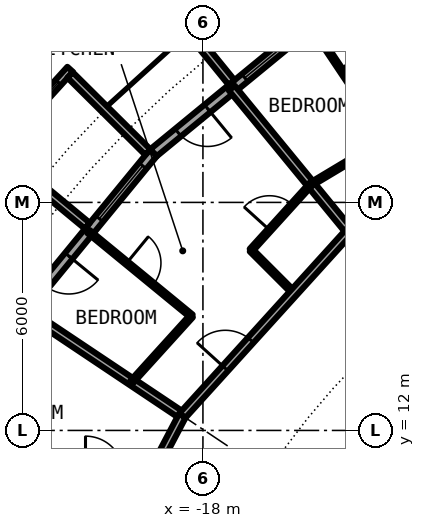
"""IFC4 building model, lengths in metres.
Left out: names, types, materials, properties, quantities, classifications, styles, units other than length and angle.
Written with IfcOpenShell. Run it as: python <this file> out.ifc"""

import sys

from ifc_helpers import new_model, si_unit, direction, frame, frame_2d, origin, place, context, subcontext, project, spatial, rectangle, circle, extrude, element, fill, save


model = new_model("IFC4")
c1 = context("Model", 3, precision=1e-05, world=origin(), true_north=direction((0.0, 1.0)))
c2 = subcontext(c1, "Body", "Model", "MODEL_VIEW")
j1 = project(units=[si_unit("LENGTHUNIT", "METRE"), si_unit("PLANEANGLEUNIT", "RADIAN")], contexts=[c1])
p1 = place(None, origin())
s1 = spatial("IfcSite", under=j1, at=p1, CompositionType="ELEMENT")
p2 = place(p1, origin())
s2 = spatial("IfcBuilding", under=s1, at=p2, CompositionType="ELEMENT")
p3 = place(p2, frame((0.0, 0.0, 145.2)))
s3 = spatial("IfcBuildingStorey", under=s2, at=p3, CompositionType="ELEMENT", Elevation=145.2)
p4 = place(p3, frame((-15.167, 22.699, 0.0), z_axis=(0.0, 0.0, 1.0), x_axis=(-0.773019449054, -0.634382322723, 0.0)))
e1 = element("IfcWall", 1, at=p4, inside=s3, PredefinedType="SOLIDWALL", context=c2, shape_type="SweptSolid", body=[
    extrude(rectangle(XDim=5.352, YDim=0.25, at=frame_2d((2.676, 0.0))), origin(), (0.0, 0.0, 1.0), 2.7),
])
p5 = place(p4, frame((0.441, 0.0, 0.3)))
e2 = element("IfcOpeningElement", 2, at=p5, cuts=e1, PredefinedType="OPENING", context=c2, shape_type="SweptSolid", body=[
    extrude(rectangle(XDim=1.8, YDim=2.1, at=frame_2d((0.9, 1.05))), frame((0.0, 0.135, 0.0), z_axis=(0.0, -1.0, 0.0), x_axis=(1.0, 0.0, 0.0)), (0.0, 0.0, 1.0), 0.27),
])
p6 = place(p4, frame((3.51, 0.0, 0.0)))
e3 = element("IfcOpeningElement", 3, at=p6, cuts=e1, PredefinedType="OPENING", context=c2, shape_type="SweptSolid", body=[
    extrude(rectangle(XDim=1.0, YDim=2.2, at=frame_2d((0.5, 1.1))), frame((0.0, 0.135, 0.0), z_axis=(0.0, -1.0, 0.0), x_axis=(1.0, 0.0, 0.0)), (0.0, 0.0, 1.0), 0.27),
])
p7 = place(p3, frame((-17.246, 21.155, -0.03), z_axis=(0.0, 0.0, 1.0), x_axis=(-0.631741648902, 0.775179004516, 0.0)))
e4 = element("IfcWall", 4, at=p7, inside=s3, PredefinedType="SOLIDWALL", context=c2, shape_type="SweptSolid", body=[
    extrude(rectangle(XDim=3.006, YDim=0.2, at=frame_2d((1.503, 0.0))), origin(), (0.0, 0.0, 1.0), 2.73),
])
p8 = place(p3, frame((-19.304, 19.304, 0.0), z_axis=(0.0, 0.0, 1.0), x_axis=(-0.634382322723, -0.773019449054, 0.0)))
e5 = element("IfcWall", 5, at=p8, inside=s3, PredefinedType="SOLIDWALL", context=c2, shape_type="SweptSolid", body=[
    extrude(rectangle(XDim=5.352, YDim=0.25, at=frame_2d((2.676, 0.0))), origin(), (0.0, 0.0, 1.0), 2.7),
])
p9 = place(p8, frame((0.441, 0.0, 0.3)))
e6 = element("IfcOpeningElement", 6, at=p9, cuts=e5, PredefinedType="OPENING", context=c2, shape_type="SweptSolid", body=[
    extrude(rectangle(XDim=1.8, YDim=2.1, at=frame_2d((0.9, 1.05))), frame((0.0, 0.135, 0.0), z_axis=(0.0, -1.0, 0.0), x_axis=(1.0, 0.0, 0.0)), (0.0, 0.0, 1.0), 0.27),
])
p10 = place(p8, frame((3.51, 0.0, 0.0)))
e7 = element("IfcOpeningElement", 7, at=p10, cuts=e5, PredefinedType="OPENING", context=c2, shape_type="SweptSolid", body=[
    extrude(rectangle(XDim=1.0, YDim=2.2, at=frame_2d((0.5, 1.1))), frame((0.0, 0.135, 0.0), z_axis=(0.0, -1.0, 0.0), x_axis=(1.0, 0.0, 0.0)), (0.0, 0.0, 1.0), 0.27),
])
p11 = place(p3, frame((-21.493, 21.5, -0.03), z_axis=(0.0, 0.0, 1.0), x_axis=(-0.671506829416, -0.740998365753, 0.0)))
e8 = element("IfcWall", 8, at=p11, inside=s3, PredefinedType="SOLIDWALL", context=c2, shape_type="SweptSolid", body=[
    extrude(rectangle(XDim=2.993, YDim=0.2, at=frame_2d((1.497, 0.0))), origin(), (0.0, 0.0, 1.0), 2.73),
])
p12 = place(p11, frame((0.457, 0.0, 0.33)))
e9 = element("IfcOpeningElement", 9, at=p12, cuts=e8, PredefinedType="OPENING", context=c2, shape_type="SweptSolid", body=[
    extrude(circle(Radius=1.04, at=frame_2d((1.04, 1.04))), frame((0.0, 0.11, 0.0), z_axis=(0.0, -1.0, 0.0), x_axis=(1.0, 0.0, 0.0)), (0.0, 0.0, 1.0), 0.22),
])
p13 = place(p3, frame((-19.45, 19.323, -0.03), z_axis=(0.0, 0.0, 1.0), x_axis=(-0.709727076896, 0.704476739375, 0.0)))
e10 = element("IfcWall", 10, at=p13, inside=s3, PredefinedType="SOLIDWALL", context=c2, shape_type="SweptSolid", body=[
    extrude(rectangle(XDim=2.883, YDim=0.2, at=frame_2d((1.441, 0.0))), origin(), (0.0, 0.0, 1.0), 2.73),
])
p14 = place(p3, frame((-21.041, 17.384, -0.03), z_axis=(0.0, 0.0, 1.0), x_axis=(-0.770784861449, 0.63709551667, 0.0)))
e11 = element("IfcWall", 11, at=p14, inside=s3, PredefinedType="SOLIDWALL", context=c2, shape_type="SweptSolid", body=[
    extrude(rectangle(XDim=3.006, YDim=0.2, at=frame_2d((1.503, 0.0))), origin(), (0.0, 0.0, 1.0), 2.73),
])
p15 = place(p3, frame((-22.595, 15.098, 0.0), z_axis=(0.0, 0.0, 1.0), x_axis=(0.831387096605, -0.55569370664, 0.0)))
e12 = element("IfcWall", 12, at=p15, inside=s3, PredefinedType="PARTITIONING", context=c2, shape_type="SweptSolid", body=[
    extrude(rectangle(XDim=4.875, YDim=0.2, at=frame_2d((2.438, 0.0))), origin(), (0.0, 0.0, 1.0), 2.7),
])
p16 = place(p3, frame((-21.012, 17.233, 0.0), z_axis=(0.0, 0.0, 1.0), x_axis=(0.773165322764, -0.634204528267, 0.0)))
e13 = element("IfcWall", 13, at=p16, inside=s3, PredefinedType="PARTITIONING", context=c2, shape_type="SweptSolid", body=[
    extrude(rectangle(XDim=3.505, YDim=0.1, at=frame_2d((1.752, 0.0))), origin(), (0.0, 0.0, 1.0), 2.7),
])
p17 = place(p16, frame((1.303, 0.0, 0.0)))
e14 = element("IfcOpeningElement", 14, at=p17, cuts=e13, PredefinedType="OPENING", context=c2, shape_type="SweptSolid", body=[
    extrude(rectangle(XDim=0.9, YDim=2.3, at=frame_2d((0.45, 1.15))), frame((0.0, 0.06, 0.0), z_axis=(0.0, -1.0, 0.0), x_axis=(1.0, 0.0, 0.0)), (0.0, 0.0, 1.0), 0.12),
])
p18 = place(p3, frame((-17.24, 21.007, 0.0), z_axis=(0.0, 0.0, 1.0), x_axis=(0.634374159378, -0.773026148273, 0.0)))
e15 = element("IfcWall", 15, at=p18, inside=s3, PredefinedType="PARTITIONING", context=c2, shape_type="SweptSolid", body=[
    extrude(rectangle(XDim=4.876, YDim=0.2, at=frame_2d((2.438, 0.0))), origin(), (0.0, 0.0, 1.0), 2.7),
])
p19 = place(p3, frame((-16.732, 16.743, 0.0), z_axis=(0.0, 0.0, 1.0), x_axis=(0.70679853939, -0.707414888673, 0.0)))
e16 = element("IfcWall", 16, at=p19, inside=s3, PredefinedType="PARTITIONING", context=c2, shape_type="SweptSolid", body=[
    extrude(rectangle(XDim=1.584, YDim=0.1, at=frame_2d((0.792, 0.0))), origin(), (0.0, 0.0, 1.0), 2.7),
])
p20 = place(p3, frame((-15.105, 22.59, 0.0), z_axis=(0.0, 0.0, 1.0), x_axis=(0.555873265997, -0.831267052246, 0.0)))
e17 = element("IfcWall", 17, at=p20, inside=s3, PredefinedType="PARTITIONING", context=c2, shape_type="SweptSolid", body=[
    extrude(rectangle(XDim=3.504, YDim=0.1, at=frame_2d((1.752, 0.0))), origin(), (0.0, 0.0, 1.0), 2.7),
])
p21 = place(p20, frame((1.302, 0.0, 0.0)))
e18 = element("IfcOpeningElement", 18, at=p21, cuts=e17, PredefinedType="OPENING", context=c2, shape_type="SweptSolid", body=[
    extrude(rectangle(XDim=0.9, YDim=2.3, at=frame_2d((0.45, 1.15))), frame((0.0, 0.06, 0.0), z_axis=(0.0, -1.0, 0.0), x_axis=(1.0, 0.0, 0.0)), (0.0, 0.0, 1.0), 0.12),
])
p22 = place(p3, frame((-14.717, 9.834, 0.0), z_axis=(0.0, 0.0, 1.0), x_axis=(0.773034536097, 0.634363938131, 0.0)))
e19 = element("IfcWall", 19, at=p22, inside=s3, PredefinedType="PARTITIONING", context=c2, shape_type="SweptSolid", body=[
    extrude(rectangle(XDim=10.277, YDim=0.2, at=frame_2d((5.138, 0.0))), origin(), (0.0, 0.0, 1.0), 2.7),
])
p23 = place(p22, frame((4.638, 0.0, 0.0)))
e20 = element("IfcOpeningElement", 20, at=p23, cuts=e19, PredefinedType="OPENING", context=c2, shape_type="SweptSolid", body=[
    extrude(rectangle(XDim=1.0, YDim=2.3, at=frame_2d((0.5, 1.15))), frame((0.0, 0.11, 0.0), z_axis=(0.0, -1.0, 0.0), x_axis=(1.0, 0.0, 0.0)), (0.0, 0.0, 1.0), 0.22),
])
p24 = place(p3, frame((-18.542, 12.389, 0.0), z_axis=(0.0, 0.0, 1.0), x_axis=(0.671561669125, 0.740948665268, 0.0)))
e21 = element("IfcWall", 21, at=p24, inside=s3, PredefinedType="PARTITIONING", context=c2, shape_type="SweptSolid", body=[
    extrude(rectangle(XDim=6.544, YDim=0.2, at=frame_2d((3.272, 0.0))), origin(), (0.0, 0.0, 1.0), 2.7),
])
p25 = place(p24, frame((1.682, 0.0, 0.0)))
e22 = element("IfcOpeningElement", 22, at=p25, cuts=e21, PredefinedType="OPENING", context=c2, shape_type="SweptSolid", body=[
    extrude(rectangle(XDim=1.0, YDim=2.3, at=frame_2d((0.5, 1.15))), frame((0.0, 0.11, 0.0), z_axis=(0.0, -1.0, 0.0), x_axis=(1.0, 0.0, 0.0)), (0.0, 0.0, 1.0), 0.22),
])
p26 = place(p3, frame((-19.307, 10.935, 0.0), z_axis=(0.0, 0.0, 1.0), x_axis=(0.465605550524, 0.884992356646, 0.0)))
e23 = element("IfcWall", 23, at=p26, inside=s3, PredefinedType="PARTITIONING", context=c2, shape_type="SweptSolid", body=[
    extrude(rectangle(XDim=1.643, YDim=0.2, at=frame_2d((0.821, 0.0))), origin(), (0.0, 0.0, 1.0), 2.7),
])
p27 = place(p3, frame((-19.872, 13.278, 0.0), z_axis=(0.0, 0.0, 1.0), x_axis=(0.671637685376, 0.740879760544, 0.0)))
e24 = element("IfcWall", 24, at=p27, inside=s3, PredefinedType="PARTITIONING", context=c2, shape_type="SweptSolid", body=[
    extrude(rectangle(XDim=2.338, YDim=0.1, at=frame_2d((1.169, 0.0))), origin(), (0.0, 0.0, 1.0), 2.7),
])
p28 = place(p3, frame((-16.732, 16.743, 0.0), z_axis=(0.0, 0.0, 1.0), x_axis=(0.671528384412, 0.740978831634, 0.0)))
e25 = element("IfcWall", 25, at=p28, inside=s3, PredefinedType="PARTITIONING", context=c2, shape_type="SweptSolid", body=[
    extrude(rectangle(XDim=2.338, YDim=0.1, at=frame_2d((1.169, 0.0))), origin(), (0.0, 0.0, 1.0), 2.7),
])
p29 = place(p28, frame((0.719, 0.0, 0.0)))
e26 = element("IfcOpeningElement", 26, at=p29, cuts=e25, PredefinedType="OPENING", context=c2, shape_type="SweptSolid", body=[
    extrude(rectangle(XDim=0.9, YDim=2.3, at=frame_2d((0.45, 1.15))), frame((0.0, 0.06, 0.0), z_axis=(0.0, -1.0, 0.0), x_axis=(1.0, 0.0, 0.0)), (0.0, 0.0, 1.0), 0.12),
])
p30 = place(p3, frame((-15.162, 18.475, 0.0), z_axis=(0.0, 0.0, 1.0), x_axis=(0.857714000218, 0.514127118358, 0.0)))
e27 = element("IfcWall", 27, at=p30, inside=s3, PredefinedType="PARTITIONING", context=c2, shape_type="SweptSolid", body=[
    extrude(rectangle(XDim=2.338, YDim=0.1, at=frame_2d((1.169, 0.0))), origin(), (0.0, 0.0, 1.0), 2.7),
])
p31 = place(p5, origin())
e28 = element("IfcWindow", 28, at=p31, inside=s3, PartitioningType="SINGLE_PANEL", PredefinedType="WINDOW", context=c2, shape_type="SweptSolid", body=[
    extrude(rectangle(XDim=1.8, YDim=2.1, at=frame_2d((0.9, 1.05))), frame((0.0, 0.03, 0.0), z_axis=(0.0, -1.0, 0.0), x_axis=(1.0, 0.0, 0.0)), (0.0, 0.0, 1.0), 0.06),
])
fill(e2, e28)
p32 = place(p6, origin())
e29 = element("IfcDoor", 29, at=p32, inside=s3, OperationType="SINGLE_SWING_LEFT", PredefinedType="DOOR", context=c2, shape_type="SweptSolid", body=[
    extrude(rectangle(XDim=1.0, YDim=2.2, at=frame_2d((0.5, 1.1))), frame((0.0, 0.025, 0.0), z_axis=(0.0, -1.0, 0.0), x_axis=(1.0, 0.0, 0.0)), (0.0, 0.0, 1.0), 0.05),
])
fill(e3, e29)
p33 = place(p9, origin())
e30 = element("IfcWindow", 30, at=p33, inside=s3, PartitioningType="SINGLE_PANEL", PredefinedType="WINDOW", context=c2, shape_type="SweptSolid", body=[
    extrude(rectangle(XDim=1.8, YDim=2.1, at=frame_2d((0.9, 1.05))), frame((0.0, 0.03, 0.0), z_axis=(0.0, -1.0, 0.0), x_axis=(1.0, 0.0, 0.0)), (0.0, 0.0, 1.0), 0.06),
])
fill(e6, e30)
p34 = place(p12, origin())
e31 = element("IfcWindow", 31, at=p34, inside=s3, PartitioningType="SINGLE_PANEL", PredefinedType="WINDOW", context=c2, shape_type="SweptSolid", body=[
    extrude(circle(Radius=1.04, at=frame_2d((1.04, 1.04))), frame((0.0, 0.03, 0.0), z_axis=(0.0, -1.0, 0.0), x_axis=(1.0, 0.0, 0.0)), (0.0, 0.0, 1.0), 0.06),
])
fill(e9, e31)
p35 = place(p10, origin())
e32 = element("IfcDoor", 32, at=p35, inside=s3, OperationType="SINGLE_SWING_LEFT", PredefinedType="DOOR", context=c2, shape_type="SweptSolid", body=[
    extrude(rectangle(XDim=1.0, YDim=2.2, at=frame_2d((0.5, 1.1))), frame((0.0, 0.025, 0.0), z_axis=(0.0, -1.0, 0.0), x_axis=(1.0, 0.0, 0.0)), (0.0, 0.0, 1.0), 0.05),
])
fill(e7, e32)
p36 = place(p21, origin())
e33 = element("IfcDoor", 33, at=p36, inside=s3, OperationType="SINGLE_SWING_RIGHT", PredefinedType="DOOR", context=c2, shape_type="SweptSolid", body=[
    extrude(rectangle(XDim=0.9, YDim=2.3, at=frame_2d((0.45, 1.15))), frame((0.0, 0.025, 0.0), z_axis=(0.0, -1.0, 0.0), x_axis=(1.0, 0.0, 0.0)), (0.0, 0.0, 1.0), 0.05),
])
fill(e18, e33)
p37 = place(p25, origin())
e34 = element("IfcDoor", 34, at=p37, inside=s3, OperationType="SINGLE_SWING_LEFT", PredefinedType="DOOR", context=c2, shape_type="SweptSolid", body=[
    extrude(rectangle(XDim=1.0, YDim=2.3, at=frame_2d((0.5, 1.15))), frame((0.0, 0.025, 0.0), z_axis=(0.0, -1.0, 0.0), x_axis=(1.0, 0.0, 0.0)), (0.0, 0.0, 1.0), 0.05),
])
fill(e22, e34)
p38 = place(p29, origin())
e35 = element("IfcDoor", 35, at=p38, inside=s3, OperationType="SINGLE_SWING_LEFT", PredefinedType="DOOR", context=c2, shape_type="SweptSolid", body=[
    extrude(rectangle(XDim=0.9, YDim=2.3, at=frame_2d((0.45, 1.15))), frame((0.0, 0.025, 0.0), z_axis=(0.0, -1.0, 0.0), x_axis=(1.0, 0.0, 0.0)), (0.0, 0.0, 1.0), 0.05),
])
fill(e26, e35)
p39 = place(p17, origin())
e36 = element("IfcDoor", 36, at=p39, inside=s3, OperationType="SINGLE_SWING_LEFT", PredefinedType="DOOR", context=c2, shape_type="SweptSolid", body=[
    extrude(rectangle(XDim=0.9, YDim=2.3, at=frame_2d((0.45, 1.15))), frame((0.0, 0.025, 0.0), z_axis=(0.0, -1.0, 0.0), x_axis=(1.0, 0.0, 0.0)), (0.0, 0.0, 1.0), 0.05),
])
fill(e14, e36)
save(model, sys.argv[1])
